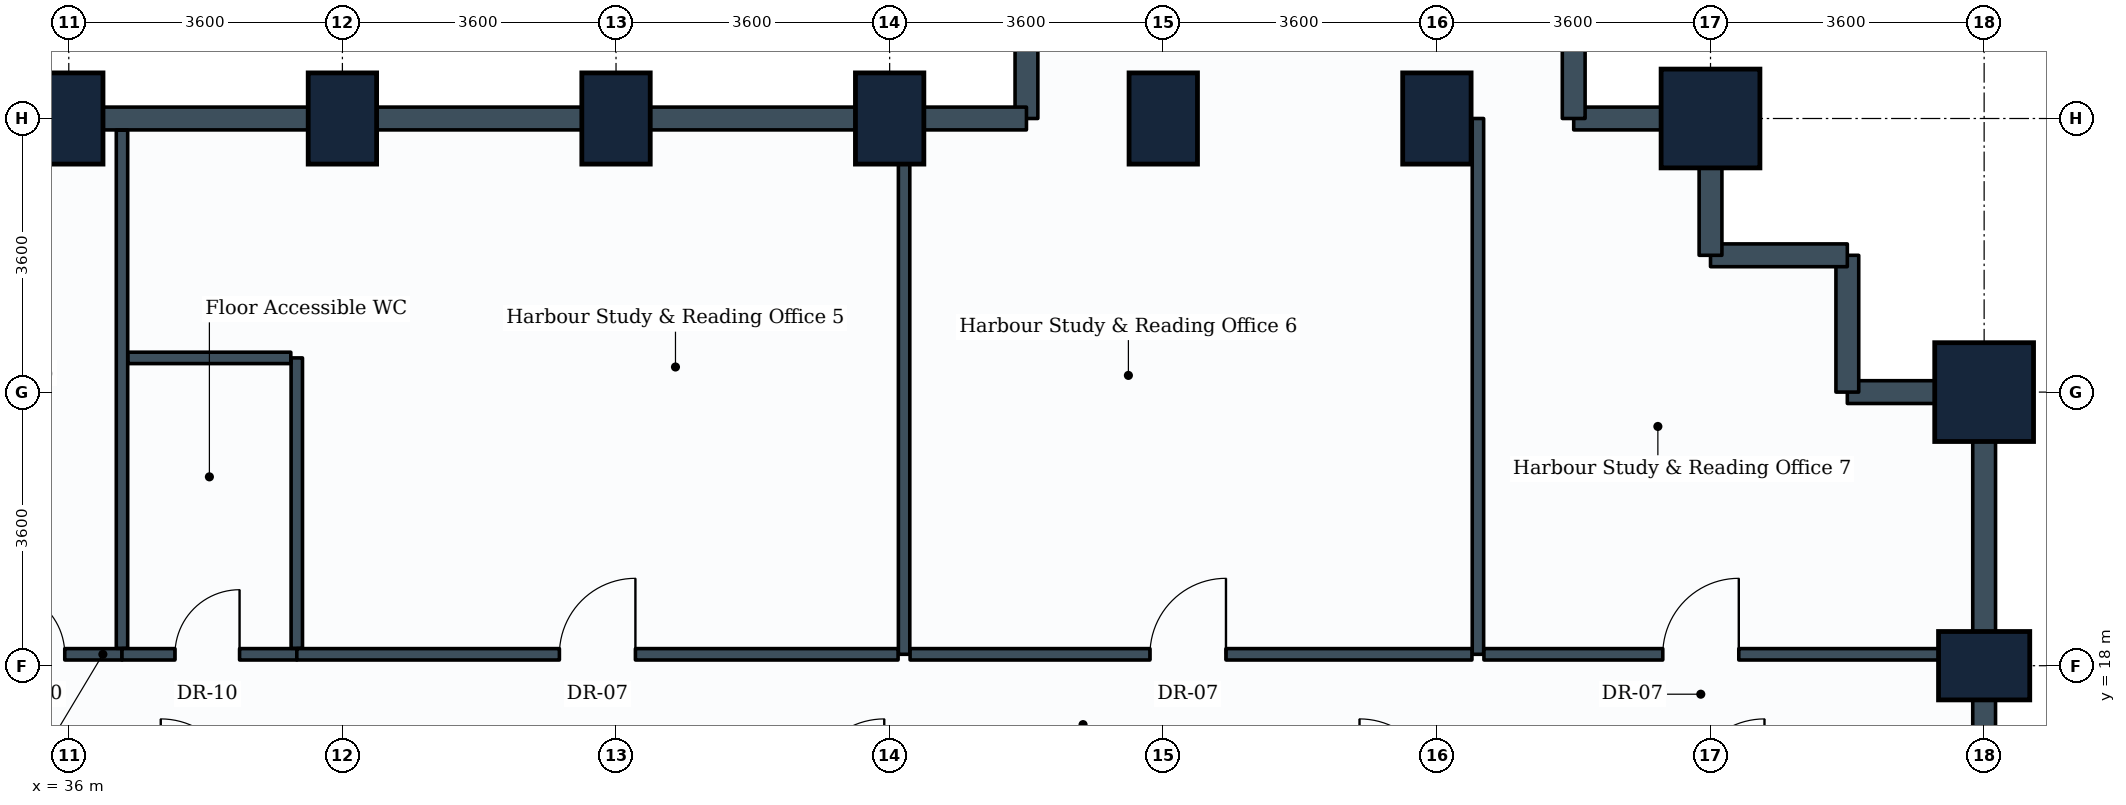
"""IFC4 building model, lengths in metres.
Left out: names, types, materials, properties, quantities, classifications, styles, units other than length and angle.
Written with IfcOpenShell. Run it as: python <this file> out.ifc"""

import sys

from ifc_helpers import new_model, si_unit, direction, frame, frame_2d, origin, origin_2d, place, context, subcontext, project, spatial, rectangle, extrude, element, fill, save


model = new_model("IFC4")
c1 = context("Model", 3, precision=1e-05, world=origin(), true_north=direction((0.0, 1.0)))
c2 = subcontext(c1, "Body", "Model", "MODEL_VIEW")
j1 = project(units=[si_unit("LENGTHUNIT", "METRE"), si_unit("PLANEANGLEUNIT", "RADIAN")], contexts=[c1])
p1 = place(None, origin())
s1 = spatial("IfcSite", under=j1, at=p1, CompositionType="ELEMENT")
p2 = place(p1, origin())
s2 = spatial("IfcBuilding", under=s1, at=p2, CompositionType="ELEMENT")
p3 = place(p2, frame((0.0, 0.0, 35.7)))
s3 = spatial("IfcBuildingStorey", under=s2, at=p3, CompositionType="ELEMENT", Elevation=35.7)
for number, where, z_axis, x_axis in (
    (1, (36.0, 25.2, 0.0), (0.0, 0.0, 1.0), (1.0, 0.0, 0.0)),
    (2, (39.6, 25.2, 0.0), (0.0, 0.0, 1.0), (1.0, 0.0, 0.0)),
    (3, (43.2, 25.2, 0.0), (0.0, 0.0, 1.0), (1.0, 0.0, 0.0)),
    (4, (46.8, 25.2, 0.0), (0.0, 0.0, 1.0), (1.0, 0.0, 0.0)),
    (5, (50.4, 25.2, 0.0), (0.0, 0.0, 1.0), (1.0, 0.0, 0.0)),
    (6, (54.0, 25.2, 0.0), (0.0, 0.0, 1.0), (1.0, 0.0, 0.0)),
):
    element("IfcColumn", number, at=place(p3, frame(where, z_axis=z_axis, x_axis=x_axis)), inside=s3, PredefinedType="COLUMN", context=c2, shape_type="SweptSolid", body=[
        extrude(rectangle(XDim=0.9, YDim=1.2, at=origin_2d()), origin(), (0.0, 0.0, 1.0), 3.9),
    ])
p4 = place(p3, frame((57.6, 25.2, 0.0), z_axis=(0.0, 0.0, 1.0), x_axis=(1.0, 0.0, 0.0)))
e7 = element("IfcColumn", 7, at=p4, inside=s3, PredefinedType="COLUMN", context=c2, shape_type="SweptSolid", body=[
    extrude(rectangle(XDim=1.3, YDim=1.3, at=origin_2d()), origin(), (0.0, 0.0, 1.0), 3.9),
])
p5 = place(p3, frame((61.2, 18.0, 0.0), z_axis=(0.0, 0.0, 1.0), x_axis=(0.0, 1.0, 0.0)))
e8 = element("IfcColumn", 8, at=p5, inside=s3, PredefinedType="COLUMN", context=c2, shape_type="SweptSolid", body=[
    extrude(rectangle(XDim=0.9, YDim=1.2, at=origin_2d()), origin(), (0.0, 0.0, 1.0), 3.9),
])
p6 = place(p3, frame((61.2, 21.6, 0.0), z_axis=(0.0, 0.0, 1.0), x_axis=(0.0, 1.0, 0.0)))
e9 = element("IfcColumn", 9, at=p6, inside=s3, PredefinedType="COLUMN", context=c2, shape_type="SweptSolid", body=[
    extrude(rectangle(XDim=1.3, YDim=1.3, at=origin_2d()), origin(), (0.0, 0.0, 1.0), 3.9),
])
for number, where, z_axis, x_axis in (
    (10, (61.2, 18.0, 0.0), (0.0, 0.0, 1.0), (0.0, -1.0, 0.0)),
    (11, (61.2, 21.6, 0.0), (0.0, 0.0, 1.0), (0.0, -1.0, 0.0)),
):
    element("IfcWall", number, at=place(p3, frame(where, z_axis=z_axis, x_axis=x_axis)), inside=s3, PredefinedType="STANDARD", context=c2, shape_type="SweptSolid", body=[
        extrude(rectangle(XDim=3.6, YDim=0.3, at=frame_2d((1.8, 0.0))), origin(), (0.0, 0.0, 1.0), 2.93),
    ])
p7 = place(p3, frame((61.2, 21.6, 0.0), z_axis=(0.0, 0.0, 1.0), x_axis=(-1.0, 0.0, 0.0)))
e12 = element("IfcWall", 12, at=p7, inside=s3, PredefinedType="STANDARD", context=c2, shape_type="SweptSolid", body=[
    extrude(rectangle(XDim=1.8, YDim=0.3, at=frame_2d((0.9, 0.0))), origin(), (0.0, 0.0, 1.0), 2.93),
])
for number, where, z_axis, x_axis in (
    (13, (59.4, 23.4, 0.0), (0.0, 0.0, 1.0), (0.0, -1.0, 0.0)),
    (14, (57.6, 23.4, 0.0), (0.0, 0.0, 1.0), (1.0, 0.0, 0.0)),
):
    element("IfcWall", number, at=place(p3, frame(where, z_axis=z_axis, x_axis=x_axis)), inside=s3, PredefinedType="STANDARD", context=c2, shape_type="SweptSolid", body=[
        extrude(rectangle(XDim=1.8, YDim=0.3, at=frame_2d((0.9, 0.0))), origin(), (0.0, 0.0, 1.0), 3.635),
    ])
for number, where, z_axis, x_axis in (
    (15, (57.6, 25.2, 0.0), (0.0, 0.0, 1.0), (0.0, -1.0, 0.0)),
    (16, (55.8, 25.2, 0.0), (0.0, 0.0, 1.0), (1.0, 0.0, 0.0)),
):
    element("IfcWall", number, at=place(p3, frame(where, z_axis=z_axis, x_axis=x_axis)), inside=s3, PredefinedType="STANDARD", context=c2, shape_type="SweptSolid", body=[
        extrude(rectangle(XDim=1.8, YDim=0.3, at=frame_2d((0.9, 0.0))), origin(), (0.0, 0.0, 1.0), 2.93),
    ])
for number, where, z_axis, x_axis in (
    (17, (55.8, 27.3, 0.0), (0.0, 0.0, 1.0), (0.0, -1.0, 0.0)),
    (18, (48.6, 27.3, 0.0), (0.0, 0.0, 1.0), (0.0, -1.0, 0.0)),
):
    element("IfcWall", number, at=place(p3, frame(where, z_axis=z_axis, x_axis=x_axis)), inside=s3, PredefinedType="STANDARD", context=c2, shape_type="SweptSolid", body=[
        extrude(rectangle(XDim=2.1, YDim=0.3, at=frame_2d((1.05, 0.0))), origin(), (0.0, 0.0, 1.0), 2.93),
    ])
p8 = place(p3, frame((46.8, 25.2, 0.0), z_axis=(0.0, 0.0, 1.0), x_axis=(1.0, 0.0, 0.0)))
e19 = element("IfcWall", 19, at=p8, inside=s3, PredefinedType="STANDARD", context=c2, shape_type="SweptSolid", body=[
    extrude(rectangle(XDim=1.8, YDim=0.3, at=frame_2d((0.9, 0.0))), origin(), (0.0, 0.0, 1.0), 2.93),
])
p9 = place(p3, frame((43.2, 25.2, 0.0), z_axis=(0.0, 0.0, 1.0), x_axis=(1.0, 0.0, 0.0)))
e20 = element("IfcWall", 20, at=p9, inside=s3, PredefinedType="STANDARD", context=c2, shape_type="SweptSolid", body=[
    extrude(rectangle(XDim=3.6, YDim=0.3, at=frame_2d((1.8, 0.0))), origin(), (0.0, 0.0, 1.0), 2.93),
])
p10 = place(p3, frame((39.6, 25.2, 0.0), z_axis=(0.0, 0.0, 1.0), x_axis=(1.0, 0.0, 0.0)))
e21 = element("IfcWall", 21, at=p10, inside=s3, PredefinedType="STANDARD", context=c2, shape_type="SweptSolid", body=[
    extrude(rectangle(XDim=3.6, YDim=0.3, at=frame_2d((1.8, 0.0))), origin(), (0.0, 0.0, 1.0), 2.93),
])
for number, where, z_axis, x_axis in (
    (22, (36.0, 25.2, 0.0), (0.0, 0.0, 1.0), (1.0, 0.0, 0.0)),
    (23, (32.4, 25.2, 0.0), (0.0, 0.0, 1.0), (1.0, 0.0, 0.0)),
):
    element("IfcWall", number, at=place(p3, frame(where, z_axis=z_axis, x_axis=x_axis)), inside=s3, PredefinedType="STANDARD", context=c2, shape_type="SweptSolid", body=[
        extrude(rectangle(XDim=3.6, YDim=0.3, at=frame_2d((1.8, 0.0))), origin(), (0.0, 0.0, 1.0), 2.93),
    ])
p11 = place(p3, frame((34.479, 18.15, 0.0), z_axis=(0.0, 0.0, 1.0), x_axis=(1.0, 0.0, 0.0)))
e24 = element("IfcWall", 24, at=p11, inside=s3, PredefinedType="PARTITIONING", context=c2, shape_type="SweptSolid", body=[
    extrude(rectangle(XDim=2.221, YDim=0.15, at=frame_2d((1.11, 0.0))), origin(), (0.0, 0.0, 1.0), 3.08),
])
p12 = place(p11, frame((0.618, 0.0, 0.0)))
e25 = element("IfcOpeningElement", 25, at=p12, cuts=e24, PredefinedType="OPENING", context=c2, shape_type="SweptSolid", body=[
    extrude(rectangle(XDim=0.85, YDim=2.1, at=frame_2d((0.425, 1.05))), frame((0.0, 0.085, 0.0), z_axis=(0.0, -1.0, 0.0), x_axis=(1.0, 0.0, 0.0)), (0.0, 0.0, 1.0), 0.17),
])
p13 = place(p3, frame((36.7, 18.229, 0.0), z_axis=(0.0, 0.0, 1.0), x_axis=(0.0, 1.0, 0.0)))
e26 = element("IfcWall", 26, at=p13, inside=s3, PredefinedType="PARTITIONING", context=c2, shape_type="SweptSolid", body=[
    extrude(rectangle(XDim=6.817, YDim=0.15, at=frame_2d((3.408, 0.0))), origin(), (0.0, 0.0, 1.0), 2.93),
])
p14 = place(p3, frame((36.7, 18.15, 0.0), z_axis=(0.0, 0.0, 1.0), x_axis=(1.0, 0.0, 0.0)))
e27 = element("IfcWall", 27, at=p14, inside=s3, PredefinedType="PARTITIONING", context=c2, shape_type="SweptSolid", body=[
    extrude(rectangle(XDim=2.3, YDim=0.15, at=frame_2d((1.15, 0.0))), origin(), (0.0, 0.0, 1.0), 3.08),
])
p15 = place(p14, frame((0.697, 0.0, 0.0)))
e28 = element("IfcOpeningElement", 28, at=p15, cuts=e27, PredefinedType="OPENING", context=c2, shape_type="SweptSolid", body=[
    extrude(rectangle(XDim=0.85, YDim=2.1, at=frame_2d((0.425, 1.05))), frame((0.0, 0.085, 0.0), z_axis=(0.0, -1.0, 0.0), x_axis=(1.0, 0.0, 0.0)), (0.0, 0.0, 1.0), 0.17),
])
p16 = place(p3, frame((39.0, 18.229, 0.0), z_axis=(0.0, 0.0, 1.0), x_axis=(0.0, 1.0, 0.0)))
e29 = element("IfcWall", 29, at=p16, inside=s3, PredefinedType="PARTITIONING", context=c2, shape_type="SweptSolid", body=[
    extrude(rectangle(XDim=3.821, YDim=0.15, at=frame_2d((1.911, 0.0))), origin(), (0.0, 0.0, 1.0), 3.03),
])
p17 = place(p3, frame((36.779, 22.05, 0.0), z_axis=(0.0, 0.0, 1.0), x_axis=(1.0, 0.0, 0.0)))
e30 = element("IfcWall", 30, at=p17, inside=s3, PredefinedType="PARTITIONING", context=c2, shape_type="SweptSolid", body=[
    extrude(rectangle(XDim=2.142, YDim=0.15, at=frame_2d((1.071, 0.0))), origin(), (0.0, 0.0, 1.0), 3.635),
])
p18 = place(p3, frame((46.99, 18.15, 0.0), z_axis=(0.0, 0.0, 1.0), x_axis=(0.0, 1.0, 0.0)))
e31 = element("IfcWall", 31, at=p18, inside=s3, PredefinedType="PARTITIONING", context=c2, shape_type="SweptSolid", body=[
    extrude(rectangle(XDim=6.896, YDim=0.15, at=frame_2d((3.448, 0.0))), origin(), (0.0, 0.0, 1.0), 2.93),
])
p19 = place(p3, frame((39.0, 18.15, 0.0), z_axis=(0.0, 0.0, 1.0), x_axis=(1.0, 0.0, 0.0)))
e32 = element("IfcWall", 32, at=p19, inside=s3, PredefinedType="PARTITIONING", context=c2, shape_type="SweptSolid", body=[
    extrude(rectangle(XDim=7.911, YDim=0.15, at=frame_2d((3.956, 0.0))), origin(), (0.0, 0.0, 1.0), 3.03),
])
p20 = place(p19, frame((3.455, 0.0, 0.0)))
e33 = element("IfcOpeningElement", 33, at=p20, cuts=e32, PredefinedType="OPENING", context=c2, shape_type="SweptSolid", body=[
    extrude(rectangle(XDim=1.0, YDim=2.1, at=frame_2d((0.5, 1.05))), frame((0.0, 0.085, 0.0), z_axis=(0.0, -1.0, 0.0), x_axis=(1.0, 0.0, 0.0)), (0.0, 0.0, 1.0), 0.17),
])
p21 = place(p3, frame((54.54, 18.15, 0.0), z_axis=(0.0, 0.0, 1.0), x_axis=(0.0, 1.0, 0.0)))
e34 = element("IfcWall", 34, at=p21, inside=s3, PredefinedType="PARTITIONING", context=c2, shape_type="SweptSolid", body=[
    extrude(rectangle(XDim=7.05, YDim=0.15, at=frame_2d((3.525, 0.0))), origin(), (0.0, 0.0, 1.0), 2.93),
])
p22 = place(p3, frame((47.069, 18.15, 0.0), z_axis=(0.0, 0.0, 1.0), x_axis=(1.0, 0.0, 0.0)))
e35 = element("IfcWall", 35, at=p22, inside=s3, PredefinedType="PARTITIONING", context=c2, shape_type="SweptSolid", body=[
    extrude(rectangle(XDim=7.392, YDim=0.15, at=frame_2d((3.696, 0.0))), origin(), (0.0, 0.0, 1.0), 3.04),
])
p23 = place(p22, frame((3.156, 0.0, 0.0)))
e36 = element("IfcOpeningElement", 36, at=p23, cuts=e35, PredefinedType="OPENING", context=c2, shape_type="SweptSolid", body=[
    extrude(rectangle(XDim=1.0, YDim=2.1, at=frame_2d((0.5, 1.05))), frame((0.0, 0.085, 0.0), z_axis=(0.0, -1.0, 0.0), x_axis=(1.0, 0.0, 0.0)), (0.0, 0.0, 1.0), 0.17),
])
p24 = place(p3, frame((54.619, 18.15, 0.0), z_axis=(0.0, 0.0, 1.0), x_axis=(1.0, 0.0, 0.0)))
e37 = element("IfcWall", 37, at=p24, inside=s3, PredefinedType="PARTITIONING", context=c2, shape_type="SweptSolid", body=[
    extrude(rectangle(XDim=6.427, YDim=0.15, at=frame_2d((3.213, 0.0))), origin(), (0.0, 0.0, 1.0), 2.93),
])
p25 = place(p24, frame((2.353, 0.0, 0.0)))
e38 = element("IfcOpeningElement", 38, at=p25, cuts=e37, PredefinedType="OPENING", context=c2, shape_type="SweptSolid", body=[
    extrude(rectangle(XDim=1.0, YDim=2.1, at=frame_2d((0.5, 1.05))), frame((0.0, 0.085, 0.0), z_axis=(0.0, -1.0, 0.0), x_axis=(1.0, 0.0, 0.0)), (0.0, 0.0, 1.0), 0.17),
])
p26 = place(p12, origin())
e39 = element("IfcDoor", 39, at=p26, inside=s3, OperationType="SINGLE_SWING_LEFT", PredefinedType="DOOR", context=c2, shape_type="SweptSolid", body=[
    extrude(rectangle(XDim=0.85, YDim=2.1, at=frame_2d((0.425, 1.05))), frame((0.0, 0.025, 0.0), z_axis=(0.0, -1.0, 0.0), x_axis=(1.0, 0.0, 0.0)), (0.0, 0.0, 1.0), 0.05),
])
fill(e25, e39)
p27 = place(p15, origin())
e40 = element("IfcDoor", 40, at=p27, inside=s3, OperationType="SINGLE_SWING_RIGHT", PredefinedType="DOOR", context=c2, shape_type="SweptSolid", body=[
    extrude(rectangle(XDim=0.85, YDim=2.1, at=frame_2d((0.425, 1.05))), frame((0.0, 0.025, 0.0), z_axis=(0.0, -1.0, 0.0), x_axis=(1.0, 0.0, 0.0)), (0.0, 0.0, 1.0), 0.05),
])
fill(e28, e40)
p28 = place(p20, origin())
e41 = element("IfcDoor", 41, at=p28, inside=s3, OperationType="SINGLE_SWING_RIGHT", PredefinedType="DOOR", context=c2, shape_type="SweptSolid", body=[
    extrude(rectangle(XDim=1.0, YDim=2.1, at=frame_2d((0.5, 1.05))), frame((0.0, 0.025, 0.0), z_axis=(0.0, -1.0, 0.0), x_axis=(1.0, 0.0, 0.0)), (0.0, 0.0, 1.0), 0.05),
])
fill(e33, e41)
p29 = place(p23, origin())
e42 = element("IfcDoor", 42, at=p29, inside=s3, OperationType="SINGLE_SWING_RIGHT", PredefinedType="DOOR", context=c2, shape_type="SweptSolid", body=[
    extrude(rectangle(XDim=1.0, YDim=2.1, at=frame_2d((0.5, 1.05))), frame((0.0, 0.025, 0.0), z_axis=(0.0, -1.0, 0.0), x_axis=(1.0, 0.0, 0.0)), (0.0, 0.0, 1.0), 0.05),
])
fill(e36, e42)
p30 = place(p25, origin())
e43 = element("IfcDoor", 43, at=p30, inside=s3, OperationType="SINGLE_SWING_RIGHT", PredefinedType="DOOR", context=c2, shape_type="SweptSolid", body=[
    extrude(rectangle(XDim=1.0, YDim=2.1, at=frame_2d((0.5, 1.05))), frame((0.0, 0.025, 0.0), z_axis=(0.0, -1.0, 0.0), x_axis=(1.0, 0.0, 0.0)), (0.0, 0.0, 1.0), 0.05),
])
fill(e38, e43)
save(model, sys.argv[1])
